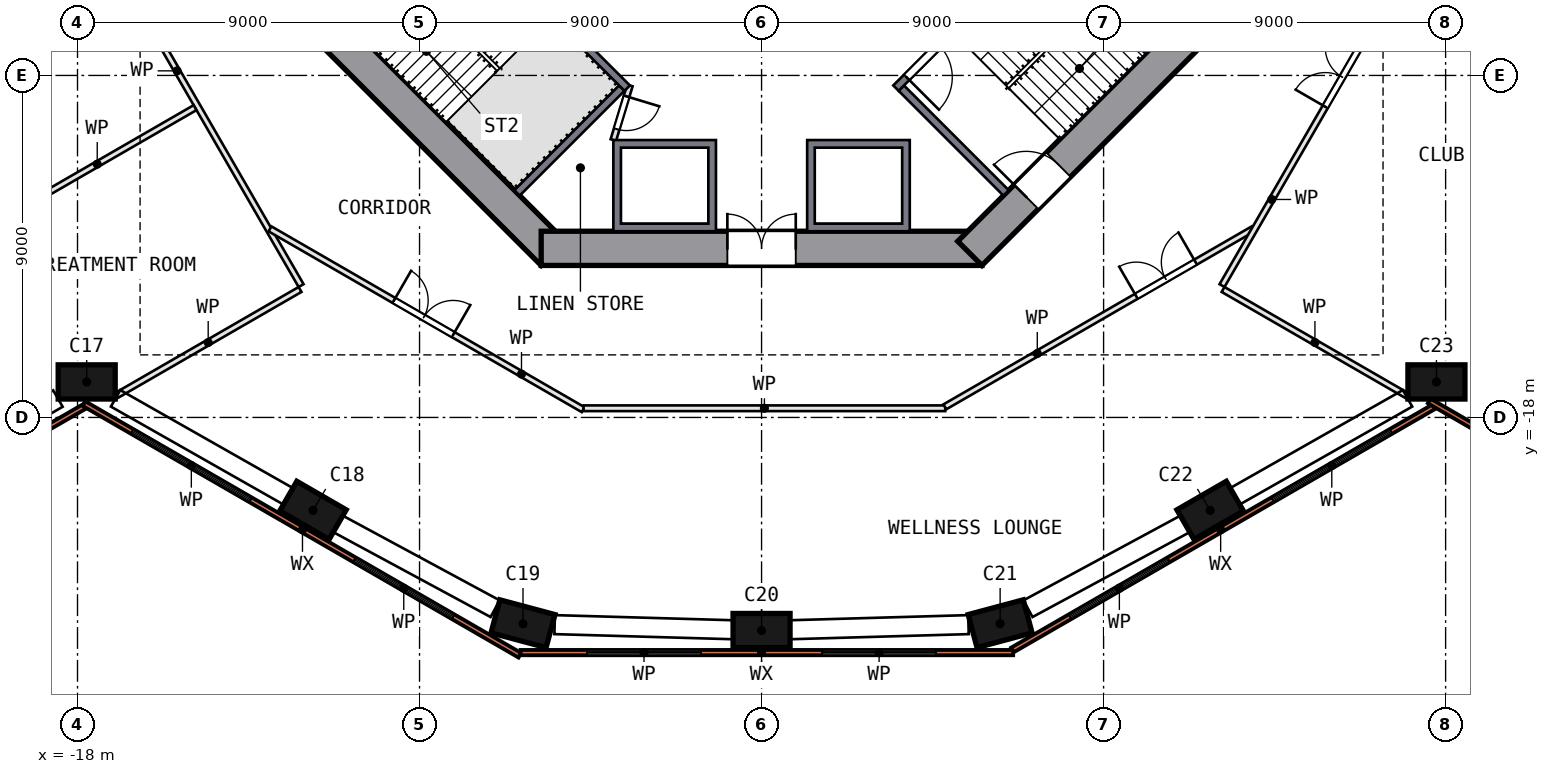
"""IFC4 building model, lengths in metres.
Left out: names, types, materials, properties, quantities, classifications, styles, units other than length and angle.
Written with IfcOpenShell. Run it as: python <this file> out.ifc"""

import sys

from ifc_helpers import new_model, si_unit, direction, frame, frame_2d, origin, origin_2d, place, context, subcontext, project, spatial, polyline, rectangle, outline, extrude, element, fill, save


model = new_model("IFC4")
c1 = context("Model", 3, precision=1e-05, world=origin(), true_north=direction((0.0, 1.0)))
c2 = subcontext(c1, "Body", "Model", "MODEL_VIEW")
j1 = project(units=[si_unit("LENGTHUNIT", "METRE"), si_unit("PLANEANGLEUNIT", "RADIAN")], contexts=[c1])
p1 = place(None, origin())
s1 = spatial("IfcSite", under=j1, at=p1, CompositionType="ELEMENT")
p2 = place(p1, origin())
s2 = spatial("IfcBuilding", under=s1, at=p2, CompositionType="ELEMENT")
p3 = place(p2, frame((0.0, 0.0, 23.5)))
s3 = spatial("IfcBuildingStorey", under=s2, at=p3, CompositionType="ELEMENT", Elevation=23.5)
for number, where, z_axis, x_axis in (
    (1, (-17.758, -17.065, 0.0), (0.0, 0.0, 1.0), (-1.0, 0.0, 0.0)),
    (2, (-11.804, -20.445, 0.0), (0.0, 0.0, 1.0), (0.866, -0.5, 0.0)),
    (3, (-6.278, -23.428, 0.0), (0.0, 0.0, 1.0), (-0.966, 0.259, 0.0)),
    (4, (0.0, -23.608, 0.0), (0.0, 0.0, 1.0), (1.0, 0.0, 0.0)),
    (5, (6.278, -23.428, 0.0), (0.0, 0.0, 1.0), (-0.966, -0.259, 0.0)),
    (6, (11.804, -20.445, 0.0), (0.0, 0.0, 1.0), (0.866, 0.5, 0.0)),
    (7, (17.758, -17.065, 0.0), (0.0, 0.0, 1.0), (-1.0, 0.0, 0.0)),
):
    element("IfcColumn", number, at=place(p3, frame(where, z_axis=z_axis, x_axis=x_axis)), inside=s3, PredefinedType="COLUMN", context=c2, shape_type="SweptSolid", body=[
        extrude(rectangle(XDim=1.5, YDim=0.9, at=origin_2d()), origin(), (0.0, 0.0, 1.0), 4.0),
    ])
p4 = place(p3, frame((-13.682, -5.481, 0.0), z_axis=(0.0, 0.0, 1.0), x_axis=(0.707106781, -0.707106781, 0.0)))
e8 = element("IfcWall", 8, at=p4, inside=s3, PredefinedType="SHEAR", context=c2, shape_type="SweptSolid", body=[
    extrude(rectangle(XDim=11.598, YDim=0.9, at=frame_2d((5.799, 0.0))), origin(), (0.0, 0.0, 1.0), 4.5),
])
p5 = place(p4, frame((2.099, 0.0, 0.0)))
e9 = element("IfcOpeningElement", 9, at=p5, cuts=e8, PredefinedType="OPENING", context=c2, shape_type="SweptSolid", body=[
    extrude(rectangle(XDim=1.2, YDim=2.1, at=frame_2d((0.6, 1.05))), frame((0.0, 0.46, 0.0), z_axis=(0.0, -1.0, 0.0), x_axis=(1.0, 0.0, 0.0)), (0.0, 0.0, 1.0), 0.92),
])
p6 = place(p3, frame((-5.799, -13.55, 0.0), z_axis=(0.0, 0.0, 1.0), x_axis=(1.0, 0.0, 0.0)))
e10 = element("IfcWall", 10, at=p6, inside=s3, PredefinedType="SHEAR", context=c2, shape_type="SweptSolid", body=[
    extrude(rectangle(XDim=11.598, YDim=0.9, at=frame_2d((5.799, 0.0))), origin(), (0.0, 0.0, 1.0), 4.5),
])
p7 = place(p6, frame((4.899, 0.0, 0.0)))
e11 = element("IfcOpeningElement", 11, at=p7, cuts=e10, PredefinedType="OPENING", context=c2, shape_type="SweptSolid", body=[
    extrude(rectangle(XDim=1.8, YDim=2.1, at=frame_2d((0.9, 1.05))), frame((0.0, 0.46, 0.0), z_axis=(0.0, -1.0, 0.0), x_axis=(1.0, 0.0, 0.0)), (0.0, 0.0, 1.0), 0.92),
])
p8 = place(p3, frame((5.481, -13.682, 0.0), z_axis=(0.0, 0.0, 1.0), x_axis=(0.707106781, 0.707106781, 0.0)))
e12 = element("IfcWall", 12, at=p8, inside=s3, PredefinedType="SHEAR", context=c2, shape_type="SweptSolid", body=[
    extrude(rectangle(XDim=11.598, YDim=0.9, at=frame_2d((5.799, 0.0))), origin(), (0.0, 0.0, 1.0), 4.5),
])
p9 = place(p8, frame((2.099, 0.0, 0.0)))
e13 = element("IfcOpeningElement", 13, at=p9, cuts=e12, PredefinedType="OPENING", context=c2, shape_type="SweptSolid", body=[
    extrude(rectangle(XDim=1.2, YDim=2.1, at=frame_2d((0.6, 1.05))), frame((0.0, 0.46, 0.0), z_axis=(0.0, -1.0, 0.0), x_axis=(1.0, 0.0, 0.0)), (0.0, 0.0, 1.0), 0.92),
])
p10 = place(p3, frame((-27.321, -23.198, 0.0), z_axis=(0.0, 0.0, 1.0), x_axis=(0.866030546, 0.499991093, 0.0)))
e14 = element("IfcWall", 14, at=p10, inside=s3, PredefinedType="SOLIDWALL", context=c2, shape_type="SweptSolid", body=[
    extrude(rectangle(XDim=10.961, YDim=0.14, at=frame_2d((5.48, 0.0))), origin(), (0.0, 0.0, 1.0), 4.0),
])
p11 = place(p10, frame((6.702, 0.0, 0.9)))
e15 = element("IfcOpeningElement", 15, at=p11, cuts=e14, PredefinedType="OPENING", context=c2, shape_type="SweptSolid", body=[
    extrude(rectangle(XDim=3.0, YDim=2.4, at=frame_2d((1.5, 1.2))), frame((0.0, 0.08, 0.0), z_axis=(0.0, -1.0, 0.0), x_axis=(1.0, 0.0, 0.0)), (0.0, 0.0, 1.0), 0.16),
])
p12 = place(p3, frame((-17.828, -17.637, 0.0), z_axis=(0.0, 0.0, 1.0), x_axis=(0.866029009, -0.499993756, 0.0)))
e16 = element("IfcWall", 16, at=p12, inside=s3, PredefinedType="SOLIDWALL", context=c2, shape_type="SweptSolid", body=[
    extrude(rectangle(XDim=13.242, YDim=0.14, at=frame_2d((6.621, 0.0))), origin(), (0.0, 0.0, 1.0), 4.0),
])
p13 = place(p12, frame((1.46, 0.0, 0.9)))
e17 = element("IfcOpeningElement", 17, at=p13, cuts=e16, PredefinedType="OPENING", context=c2, shape_type="SweptSolid", body=[
    extrude(rectangle(XDim=3.6, YDim=2.4, at=frame_2d((1.8, 1.2))), frame((0.0, 0.08, 0.0), z_axis=(0.0, -1.0, 0.0), x_axis=(1.0, 0.0, 0.0)), (0.0, 0.0, 1.0), 0.16),
])
p14 = place(p12, frame((8.215, 0.0, 0.9)))
e18 = element("IfcOpeningElement", 18, at=p14, cuts=e16, PredefinedType="OPENING", context=c2, shape_type="SweptSolid", body=[
    extrude(rectangle(XDim=3.0, YDim=2.4, at=frame_2d((1.5, 1.2))), frame((0.0, 0.08, 0.0), z_axis=(0.0, -1.0, 0.0), x_axis=(1.0, 0.0, 0.0)), (0.0, 0.0, 1.0), 0.16),
])
p15 = place(p3, frame((-6.341, -24.188, 0.0), z_axis=(0.0, 0.0, 1.0), x_axis=(1.0, 0.0, 0.0)))
e19 = element("IfcWall", 19, at=p15, inside=s3, PredefinedType="SOLIDWALL", context=c2, shape_type="SweptSolid", body=[
    extrude(rectangle(XDim=12.962, YDim=0.14, at=frame_2d((6.481, 0.0))), origin(), (0.0, 0.0, 1.0), 4.0),
])
p16 = place(p15, frame((1.748, 0.0, 0.9)))
e20 = element("IfcOpeningElement", 20, at=p16, cuts=e19, PredefinedType="OPENING", context=c2, shape_type="SweptSolid", body=[
    extrude(rectangle(XDim=3.0, YDim=2.4, at=frame_2d((1.5, 1.2))), frame((0.0, 0.08, 0.0), z_axis=(0.0, -1.0, 0.0), x_axis=(1.0, 0.0, 0.0)), (0.0, 0.0, 1.0), 0.16),
])
p17 = place(p15, frame((7.935, 0.0, 0.9)))
e21 = element("IfcOpeningElement", 21, at=p17, cuts=e19, PredefinedType="OPENING", context=c2, shape_type="SweptSolid", body=[
    extrude(rectangle(XDim=3.0, YDim=2.4, at=frame_2d((1.5, 1.2))), frame((0.0, 0.08, 0.0), z_axis=(0.0, -1.0, 0.0), x_axis=(1.0, 0.0, 0.0)), (0.0, 0.0, 1.0), 0.16),
])
p18 = place(p3, frame((6.603, -24.118, 0.0), z_axis=(0.0, 0.0, 1.0), x_axis=(0.866023287, 0.500003667, 0.0)))
e22 = element("IfcWall", 22, at=p18, inside=s3, PredefinedType="SOLIDWALL", context=c2, shape_type="SweptSolid", body=[
    extrude(rectangle(XDim=12.801, YDim=0.14, at=frame_2d((6.4, 0.0))), origin(), (0.0, 0.0, 1.0), 4.0),
])
p19 = place(p18, frame((1.748, 0.0, 0.9)))
e23 = element("IfcOpeningElement", 23, at=p19, cuts=e22, PredefinedType="OPENING", context=c2, shape_type="SweptSolid", body=[
    extrude(rectangle(XDim=3.0, YDim=2.4, at=frame_2d((1.5, 1.2))), frame((0.0, 0.08, 0.0), z_axis=(0.0, -1.0, 0.0), x_axis=(1.0, 0.0, 0.0)), (0.0, 0.0, 1.0), 0.16),
])
p20 = place(p18, frame((7.902, 0.0, 0.9)))
e24 = element("IfcOpeningElement", 24, at=p20, cuts=e22, PredefinedType="OPENING", context=c2, shape_type="SweptSolid", body=[
    extrude(rectangle(XDim=3.6, YDim=2.4, at=frame_2d((1.8, 1.2))), frame((0.0, 0.08, 0.0), z_axis=(0.0, -1.0, 0.0), x_axis=(1.0, 0.0, 0.0)), (0.0, 0.0, 1.0), 0.16),
])
p21 = place(p3, frame((17.565, -17.566, 0.0), z_axis=(0.0, 0.0, 1.0), x_axis=(0.866028022, -0.499995465, 0.0)))
e25 = element("IfcWall", 25, at=p21, inside=s3, PredefinedType="SOLIDWALL", context=c2, shape_type="SweptSolid", body=[
    extrude(rectangle(XDim=11.405, YDim=0.14, at=frame_2d((5.702, 0.0))), origin(), (0.0, 0.0, 1.0), 4.0),
])
p22 = place(p21, frame((1.623, 0.0, 0.9)))
e26 = element("IfcOpeningElement", 26, at=p22, cuts=e25, PredefinedType="OPENING", context=c2, shape_type="SweptSolid", body=[
    extrude(rectangle(XDim=3.6, YDim=2.4, at=frame_2d((1.8, 1.2))), frame((0.0, 0.08, 0.0), z_axis=(0.0, -1.0, 0.0), x_axis=(1.0, 0.0, 0.0)), (0.0, 0.0, 1.0), 0.16),
])
p23 = place(p3, origin())
e27 = element("IfcWall", 27, at=p23, inside=s3, PredefinedType="SOLIDWALL", context=c2, shape_type="SweptSolid", body=[
    extrude(outline(polyline([(-1.2, -13.1), (-3.9, -13.1), (-3.9, -10.7), (-1.2, -10.7), (-1.2, -13.1)]), holes=[polyline([(-3.7, -10.9), (-3.7, -12.9), (-1.4, -12.9), (-1.4, -10.9), (-3.7, -10.9)])]), origin(), (0.0, 0.0, 1.0), 4.0),
])
p24 = place(p3, origin())
e28 = element("IfcWall", 28, at=p24, inside=s3, PredefinedType="SOLIDWALL", context=c2, shape_type="SweptSolid", body=[
    extrude(outline(polyline([(3.9, -10.7), (3.9, -13.1), (1.2, -13.1), (1.2, -10.7), (3.9, -10.7)]), holes=[polyline([(1.4, -12.9), (3.7, -12.9), (3.7, -10.9), (1.4, -10.9), (1.4, -12.9)])]), origin(), (0.0, 0.0, 1.0), 4.0),
])
p25 = place(p3, frame((-3.535, -9.334, 0.0), z_axis=(0.0, 0.0, 1.0), x_axis=(-0.707106781, 0.707106781, 0.0)))
e29 = element("IfcWall", 29, at=p25, inside=s3, PredefinedType="SOLIDWALL", context=c2, shape_type="SweptSolid", body=[
    extrude(rectangle(XDim=8.2, YDim=0.2, at=frame_2d((4.1, 0.0))), origin(), (0.0, 0.0, 1.0), 4.0),
])
p26 = place(p25, frame((6.6, 0.0, 0.0)))
e30 = element("IfcOpeningElement", 30, at=p26, cuts=e29, PredefinedType="OPENING", context=c2, shape_type="SweptSolid", body=[
    extrude(rectangle(XDim=1.2, YDim=2.1, at=frame_2d((0.6, 1.05))), frame((0.0, 0.11, 0.0), z_axis=(0.0, -1.0, 0.0), x_axis=(1.0, 0.0, 0.0)), (0.0, 0.0, 1.0), 0.22),
])
p27 = place(p3, frame((-3.677, -9.334, 0.0), z_axis=(0.0, 0.0, 1.0), x_axis=(-0.707106781, -0.707106781, 0.0)))
e31 = element("IfcWall", 31, at=p27, inside=s3, PredefinedType="SOLIDWALL", context=c2, shape_type="SweptSolid", body=[
    extrude(rectangle(XDim=3.9, YDim=0.2, at=frame_2d((1.95, 0.0))), origin(), (0.0, 0.0, 1.0), 4.0),
])
p28 = place(p3, frame((9.334, -3.535, 0.0), z_axis=(0.0, 0.0, 1.0), x_axis=(-0.707106781, -0.707106781, 0.0)))
e32 = element("IfcWall", 32, at=p28, inside=s3, PredefinedType="SOLIDWALL", context=c2, shape_type="SweptSolid", body=[
    extrude(rectangle(XDim=8.2, YDim=0.2, at=frame_2d((4.1, 0.0))), origin(), (0.0, 0.0, 1.0), 4.0),
])
p29 = place(p28, frame((6.6, 0.0, 0.0)))
e33 = element("IfcOpeningElement", 33, at=p29, cuts=e32, PredefinedType="OPENING", context=c2, shape_type="SweptSolid", body=[
    extrude(rectangle(XDim=1.2, YDim=2.1, at=frame_2d((0.6, 1.05))), frame((0.0, 0.11, 0.0), z_axis=(0.0, -1.0, 0.0), x_axis=(1.0, 0.0, 0.0)), (0.0, 0.0, 1.0), 0.22),
])
p30 = place(p3, frame((3.677, -9.334, 0.0), z_axis=(0.0, 0.0, 1.0), x_axis=(0.707106781, -0.707106781, 0.0)))
e34 = element("IfcWall", 34, at=p30, inside=s3, PredefinedType="SOLIDWALL", context=c2, shape_type="SweptSolid", body=[
    extrude(rectangle(XDim=3.9, YDim=0.2, at=frame_2d((1.95, 0.0))), origin(), (0.0, 0.0, 1.0), 4.0),
])
p31 = place(p3, frame((-3.465, -9.263, 0.0), z_axis=(0.0, 0.0, 1.0), x_axis=(-0.289808785, -0.957084567, 0.0)))
e35 = element("IfcWall", 35, at=p31, inside=s3, PredefinedType="PARTITIONING", context=c2, shape_type="SweptSolid", body=[
    extrude(rectangle(XDim=1.501, YDim=0.15, at=frame_2d((0.75, 0.0))), origin(), (0.0, 0.0, 1.0), 4.0),
])
p32 = place(p31, frame((0.301, 0.0, 0.0)))
e36 = element("IfcOpeningElement", 36, at=p32, cuts=e35, PredefinedType="OPENING", context=c2, shape_type="SweptSolid", body=[
    extrude(rectangle(XDim=0.9, YDim=2.1, at=frame_2d((0.45, 1.05))), frame((0.0, 0.085, 0.0), z_axis=(0.0, -1.0, 0.0), x_axis=(1.0, 0.0, 0.0)), (0.0, 0.0, 1.0), 0.17),
])
p33 = place(p3, frame((-18.642, -3.228, 0.0), z_axis=(0.0, 0.0, 1.0), x_axis=(0.499998298, -0.866026387, 0.0)))
e37 = element("IfcWall", 37, at=p33, inside=s3, PredefinedType="PARTITIONING", context=c2, shape_type="SweptSolid", body=[
    extrude(rectangle(XDim=13.05, YDim=0.15, at=frame_2d((6.525, 0.0))), origin(), (0.0, 0.0, 1.0), 4.0),
])
p34 = place(p3, frame((-16.978, -17.424, 0.0), z_axis=(0.0, 0.0, 1.0), x_axis=(0.866016603, 0.500015243, 0.0)))
e38 = element("IfcWall", 38, at=p34, inside=s3, PredefinedType="PARTITIONING", context=c2, shape_type="SweptSolid", body=[
    extrude(rectangle(XDim=5.582, YDim=0.15, at=frame_2d((2.791, 0.0))), origin(), (0.0, 0.0, 1.0), 4.0),
])
p35 = place(p3, frame((-14.906, -9.848, 0.0), z_axis=(0.0, 0.0, 1.0), x_axis=(-0.866038559, -0.499977214, 0.0)))
e39 = element("IfcWall", 39, at=p35, inside=s3, PredefinedType="PARTITIONING", context=c2, shape_type="SweptSolid", body=[
    extrude(rectangle(XDim=5.945, YDim=0.15, at=frame_2d((2.973, 0.0))), origin(), (0.0, 0.0, 1.0), 4.0),
])
p36 = place(p3, frame((-12.935, -13.038, 0.0), z_axis=(0.0, 0.0, 1.0), x_axis=(0.866027519, -0.499996337, 0.0)))
e40 = element("IfcWall", 40, at=p36, inside=s3, PredefinedType="PARTITIONING", context=c2, shape_type="SweptSolid", body=[
    extrude(rectangle(XDim=9.517, YDim=0.15, at=frame_2d((4.758, 0.0))), origin(), (0.0, 0.0, 1.0), 4.0),
])
p37 = place(p36, frame((3.767, 0.0, 0.0)))
e41 = element("IfcOpeningElement", 41, at=p37, cuts=e40, PredefinedType="OPENING", context=c2, shape_type="SweptSolid", body=[
    extrude(rectangle(XDim=1.8, YDim=2.1, at=frame_2d((0.9, 1.05))), frame((0.0, 0.085, 0.0), z_axis=(0.0, -1.0, 0.0), x_axis=(1.0, 0.0, 0.0)), (0.0, 0.0, 1.0), 0.17),
])
p38 = place(p3, frame((4.833, -17.758, 0.0), z_axis=(0.0, 0.0, 1.0), x_axis=(-1.0, 0.0, 0.0)))
e42 = element("IfcWall", 42, at=p38, inside=s3, PredefinedType="PARTITIONING", context=c2, shape_type="SweptSolid", body=[
    extrude(rectangle(XDim=9.517, YDim=0.15, at=frame_2d((4.758, 0.0))), origin(), (0.0, 0.0, 1.0), 4.0),
])
p39 = place(p3, frame((12.144, -14.633, 0.0), z_axis=(0.0, 0.0, 1.0), x_axis=(0.866016603, -0.500015243, 0.0)))
e43 = element("IfcWall", 43, at=p39, inside=s3, PredefinedType="PARTITIONING", context=c2, shape_type="SweptSolid", body=[
    extrude(rectangle(XDim=5.582, YDim=0.15, at=frame_2d((2.791, 0.0))), origin(), (0.0, 0.0, 1.0), 4.0),
])
p40 = place(p3, frame((4.823, -17.721, 0.0), z_axis=(0.0, 0.0, 1.0), x_axis=(0.866037142, 0.499979668, 0.0)))
e44 = element("IfcWall", 44, at=p40, inside=s3, PredefinedType="PARTITIONING", context=c2, shape_type="SweptSolid", body=[
    extrude(rectangle(XDim=9.367, YDim=0.15, at=frame_2d((4.683, 0.0))), origin(), (0.0, 0.0, 1.0), 4.0),
])
p41 = place(p40, frame((5.817, 0.0, 0.0)))
e45 = element("IfcOpeningElement", 45, at=p41, cuts=e44, PredefinedType="OPENING", context=c2, shape_type="SweptSolid", body=[
    extrude(rectangle(XDim=1.8, YDim=2.1, at=frame_2d((0.9, 1.05))), frame((0.0, 0.085, 0.0), z_axis=(0.0, -1.0, 0.0), x_axis=(1.0, 0.0, 0.0)), (0.0, 0.0, 1.0), 0.17),
])
p42 = place(p3, frame((12.117, -14.53, 0.0), z_axis=(0.0, 0.0, 1.0), x_axis=(0.500001509, 0.866024532, 0.0)))
e46 = element("IfcWall", 46, at=p42, inside=s3, PredefinedType="PARTITIONING", context=c2, shape_type="SweptSolid", body=[
    extrude(rectangle(XDim=11.183, YDim=0.15, at=frame_2d((5.592, 0.0))), origin(), (0.0, 0.0, 1.0), 4.0),
])
p43 = place(p42, frame((5.433, 0.0, 0.0)))
e47 = element("IfcOpeningElement", 47, at=p43, cuts=e46, PredefinedType="OPENING", context=c2, shape_type="SweptSolid", body=[
    extrude(rectangle(XDim=1.8, YDim=2.1, at=frame_2d((0.9, 1.05))), frame((0.0, 0.085, 0.0), z_axis=(0.0, -1.0, 0.0), x_axis=(1.0, 0.0, 0.0)), (0.0, 0.0, 1.0), 0.17),
])
p44 = place(p13, origin())
e48 = element("IfcWindow", 48, at=p44, inside=s3, PartitioningType="SINGLE_PANEL", PredefinedType="WINDOW", context=c2, shape_type="SweptSolid", body=[
    extrude(rectangle(XDim=3.6, YDim=2.4, at=frame_2d((1.8, 1.2))), frame((0.0, 0.03, 0.0), z_axis=(0.0, -1.0, 0.0), x_axis=(1.0, 0.0, 0.0)), (0.0, 0.0, 1.0), 0.06),
])
fill(e17, e48)
p45 = place(p14, origin())
e49 = element("IfcWindow", 49, at=p45, inside=s3, PartitioningType="SINGLE_PANEL", PredefinedType="WINDOW", context=c2, shape_type="SweptSolid", body=[
    extrude(rectangle(XDim=3.0, YDim=2.4, at=frame_2d((1.5, 1.2))), frame((0.0, 0.03, 0.0), z_axis=(0.0, -1.0, 0.0), x_axis=(1.0, 0.0, 0.0)), (0.0, 0.0, 1.0), 0.06),
])
fill(e18, e49)
p46 = place(p16, origin())
e50 = element("IfcWindow", 50, at=p46, inside=s3, PartitioningType="SINGLE_PANEL", PredefinedType="WINDOW", context=c2, shape_type="SweptSolid", body=[
    extrude(rectangle(XDim=3.0, YDim=2.4, at=frame_2d((1.5, 1.2))), frame((0.0, 0.03, 0.0), z_axis=(0.0, -1.0, 0.0), x_axis=(1.0, 0.0, 0.0)), (0.0, 0.0, 1.0), 0.06),
])
fill(e20, e50)
p47 = place(p17, origin())
e51 = element("IfcWindow", 51, at=p47, inside=s3, PartitioningType="SINGLE_PANEL", PredefinedType="WINDOW", context=c2, shape_type="SweptSolid", body=[
    extrude(rectangle(XDim=3.0, YDim=2.4, at=frame_2d((1.5, 1.2))), frame((0.0, 0.03, 0.0), z_axis=(0.0, -1.0, 0.0), x_axis=(1.0, 0.0, 0.0)), (0.0, 0.0, 1.0), 0.06),
])
fill(e21, e51)
p48 = place(p19, origin())
e52 = element("IfcWindow", 52, at=p48, inside=s3, PartitioningType="SINGLE_PANEL", PredefinedType="WINDOW", context=c2, shape_type="SweptSolid", body=[
    extrude(rectangle(XDim=3.0, YDim=2.4, at=frame_2d((1.5, 1.2))), frame((0.0, 0.03, 0.0), z_axis=(0.0, -1.0, 0.0), x_axis=(1.0, 0.0, 0.0)), (0.0, 0.0, 1.0), 0.06),
])
fill(e23, e52)
p49 = place(p20, origin())
e53 = element("IfcWindow", 53, at=p49, inside=s3, PartitioningType="SINGLE_PANEL", PredefinedType="WINDOW", context=c2, shape_type="SweptSolid", body=[
    extrude(rectangle(XDim=3.6, YDim=2.4, at=frame_2d((1.8, 1.2))), frame((0.0, 0.03, 0.0), z_axis=(0.0, -1.0, 0.0), x_axis=(1.0, 0.0, 0.0)), (0.0, 0.0, 1.0), 0.06),
])
fill(e24, e53)
p50 = place(p29, origin())
e54 = element("IfcDoor", 54, at=p50, inside=s3, OperationType="SINGLE_SWING_RIGHT", PredefinedType="DOOR", context=c2, shape_type="SweptSolid", body=[
    extrude(rectangle(XDim=1.2, YDim=2.1, at=frame_2d((0.6, 1.05))), frame((0.0, 0.025, 0.0), z_axis=(0.0, -1.0, 0.0), x_axis=(1.0, 0.0, 0.0)), (0.0, 0.0, 1.0), 0.05),
])
fill(e33, e54)
p51 = place(p7, origin())
e55 = element("IfcDoor", 55, at=p51, inside=s3, OperationType="DOUBLE_DOOR_SINGLE_SWING", PredefinedType="DOOR", context=c2, shape_type="SweptSolid", body=[
    extrude(rectangle(XDim=1.8, YDim=2.1, at=frame_2d((0.9, 1.05))), frame((0.0, 0.025, 0.0), z_axis=(0.0, -1.0, 0.0), x_axis=(1.0, 0.0, 0.0)), (0.0, 0.0, 1.0), 0.05),
])
fill(e11, e55)
p52 = place(p9, origin())
e56 = element("IfcDoor", 56, at=p52, inside=s3, OperationType="SINGLE_SWING_LEFT", PredefinedType="DOOR", context=c2, shape_type="SweptSolid", body=[
    extrude(rectangle(XDim=1.2, YDim=2.1, at=frame_2d((0.6, 1.05))), frame((0.0, 0.025, 0.0), z_axis=(0.0, -1.0, 0.0), x_axis=(1.0, 0.0, 0.0)), (0.0, 0.0, 1.0), 0.05),
])
fill(e13, e56)
p53 = place(p32, origin())
e57 = element("IfcDoor", 57, at=p53, inside=s3, OperationType="SINGLE_SWING_LEFT", PredefinedType="DOOR", context=c2, shape_type="SweptSolid", body=[
    extrude(rectangle(XDim=0.9, YDim=2.1, at=frame_2d((0.45, 1.05))), frame((0.0, 0.025, 0.0), z_axis=(0.0, -1.0, 0.0), x_axis=(1.0, 0.0, 0.0)), (0.0, 0.0, 1.0), 0.05),
])
fill(e36, e57)
p54 = place(p37, origin())
e58 = element("IfcDoor", 58, at=p54, inside=s3, OperationType="DOUBLE_DOOR_SINGLE_SWING", PredefinedType="DOOR", context=c2, shape_type="SweptSolid", body=[
    extrude(rectangle(XDim=1.8, YDim=2.1, at=frame_2d((0.9, 1.05))), frame((0.0, 0.025, 0.0), z_axis=(0.0, -1.0, 0.0), x_axis=(1.0, 0.0, 0.0)), (0.0, 0.0, 1.0), 0.05),
])
fill(e41, e58)
p55 = place(p41, origin())
e59 = element("IfcDoor", 59, at=p55, inside=s3, OperationType="DOUBLE_DOOR_SINGLE_SWING", PredefinedType="DOOR", context=c2, shape_type="SweptSolid", body=[
    extrude(rectangle(XDim=1.8, YDim=2.1, at=frame_2d((0.9, 1.05))), frame((0.0, 0.025, 0.0), z_axis=(0.0, -1.0, 0.0), x_axis=(1.0, 0.0, 0.0)), (0.0, 0.0, 1.0), 0.05),
])
fill(e45, e59)
p56 = place(p43, origin())
e60 = element("IfcDoor", 60, at=p56, inside=s3, OperationType="DOUBLE_DOOR_SINGLE_SWING", PredefinedType="DOOR", context=c2, shape_type="SweptSolid", body=[
    extrude(rectangle(XDim=1.8, YDim=2.1, at=frame_2d((0.9, 1.05))), frame((0.0, 0.025, 0.0), z_axis=(0.0, -1.0, 0.0), x_axis=(1.0, 0.0, 0.0)), (0.0, 0.0, 1.0), 0.05),
])
fill(e47, e60)
save(model, sys.argv[1])
